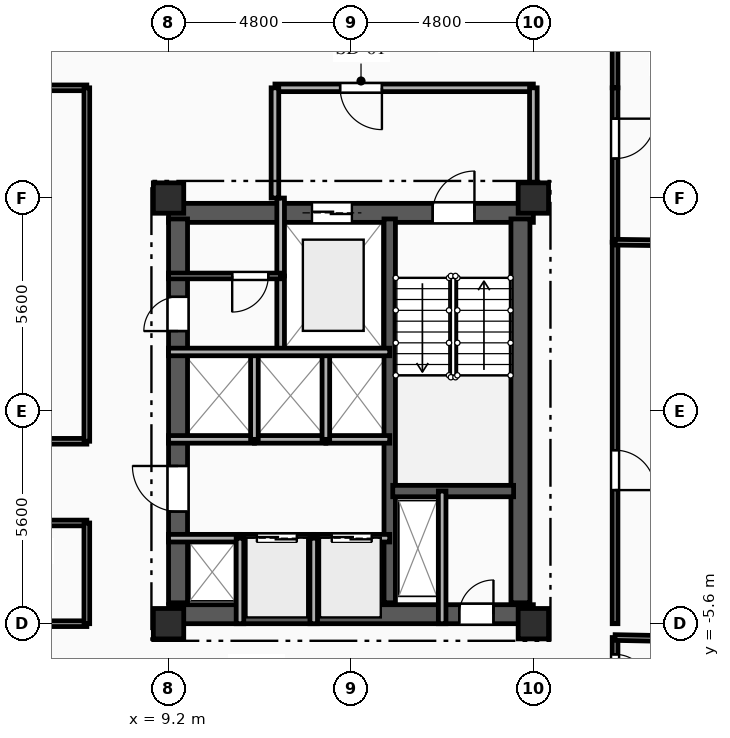
"""IFC4 building model, lengths in metres.
Left out: names, types, materials, properties, quantities, classifications, styles, units other than length and angle.
Written with IfcOpenShell. Run it as: python <this file> out.ifc"""

import sys

from ifc_helpers import new_model, si_unit, direction, frame, frame_2d, origin, origin_2d, place, context, subcontext, project, spatial, rectangle, extrude, element, fill, save


model = new_model("IFC4")
c1 = context("Model", 3, precision=1e-05, world=origin(), true_north=direction((0.0, 1.0)))
c2 = subcontext(c1, "Body", "Model", "MODEL_VIEW")
j1 = project(units=[si_unit("LENGTHUNIT", "METRE"), si_unit("PLANEANGLEUNIT", "RADIAN")], contexts=[c1])
p1 = place(None, origin())
s1 = spatial("IfcSite", under=j1, at=p1, CompositionType="ELEMENT")
p2 = place(p1, origin())
s2 = spatial("IfcBuilding", under=s1, at=p2, CompositionType="ELEMENT")
p3 = place(p2, frame((0.0, 0.0, 193.05)))
s3 = spatial("IfcBuildingStorey", under=s2, at=p3, CompositionType="ELEMENT", Elevation=193.05)
for number, where, z_axis, x_axis in (
    (1, (9.2, -5.6, 0.0), (0.0, 0.0, 1.0), (1.0, 0.0, 0.0)),
    (2, (9.2, 5.6, 0.0), (0.0, 0.0, 1.0), (1.0, 0.0, 0.0)),
    (3, (18.8, -5.6, 0.0), (0.0, 0.0, 1.0), (1.0, 0.0, 0.0)),
    (4, (18.8, 5.6, 0.0), (0.0, 0.0, 1.0), (1.0, 0.0, 0.0)),
):
    element("IfcColumn", number, at=place(p3, frame(where, z_axis=z_axis, x_axis=x_axis)), inside=s3, PredefinedType="COLUMN", context=c2, shape_type="SweptSolid", body=[
        extrude(rectangle(XDim=0.8, YDim=0.8, at=origin_2d()), origin(), (0.0, 0.0, 1.0), 3.35),
    ])
p4 = place(p3, frame((9.2, 5.21, 0.0), z_axis=(0.0, 0.0, 1.0), x_axis=(1.0, 0.0, 0.0)))
e5 = element("IfcWall", 5, at=p4, inside=s3, PredefinedType="SHEAR", context=c2, shape_type="SweptSolid", body=[
    extrude(rectangle(XDim=9.6, YDim=0.5, at=frame_2d((4.8, 0.0))), origin(), (0.0, 0.0, 1.0), 3.04),
])
p5 = place(p4, frame((6.95, 0.0, 0.0)))
e6 = element("IfcOpeningElement", 6, at=p5, cuts=e5, PredefinedType="OPENING", context=c2, shape_type="SweptSolid", body=[
    extrude(rectangle(XDim=1.1, YDim=2.15, at=frame_2d((0.55, 1.075))), frame((0.0, 0.26, 0.0), z_axis=(0.0, -1.0, 0.0), x_axis=(1.0, 0.0, 0.0)), (0.0, 0.0, 1.0), 0.52),
])
p6 = place(p4, frame((3.775, 0.0, 0.0)))
e7 = element("IfcOpeningElement", 7, at=p6, cuts=e5, PredefinedType="OPENING", context=c2, shape_type="SweptSolid", body=[
    extrude(rectangle(XDim=1.05, YDim=2.1, at=frame_2d((0.525, 1.05))), frame((0.0, 0.26, 0.0), z_axis=(0.0, -1.0, 0.0), x_axis=(1.0, 0.0, 0.0)), (0.0, 0.0, 1.0), 0.52),
])
p7 = place(p3, frame((9.2, -5.35, 0.0), z_axis=(0.0, 0.0, 1.0), x_axis=(1.0, 0.0, 0.0)))
e8 = element("IfcWall", 8, at=p7, inside=s3, PredefinedType="SHEAR", context=c2, shape_type="SweptSolid", body=[
    extrude(rectangle(XDim=9.6, YDim=0.5, at=frame_2d((4.8, 0.0))), origin(), (0.0, 0.0, 1.0), 3.04),
])
p8 = place(p7, frame((7.65, 0.0, 0.0)))
e9 = element("IfcOpeningElement", 9, at=p8, cuts=e8, PredefinedType="OPENING", context=c2, shape_type="SweptSolid", body=[
    extrude(rectangle(XDim=0.9, YDim=2.1, at=frame_2d((0.45, 1.05))), frame((0.0, 0.26, 0.0), z_axis=(0.0, -1.0, 0.0), x_axis=(1.0, 0.0, 0.0)), (0.0, 0.0, 1.0), 0.52),
])
p9 = place(p3, frame((9.45, -5.05, 0.0), z_axis=(0.0, 0.0, 1.0), x_axis=(0.0, 1.0, 0.0)))
e10 = element("IfcWall", 10, at=p9, inside=s3, PredefinedType="SHEAR", context=c2, shape_type="SweptSolid", body=[
    extrude(rectangle(XDim=10.1, YDim=0.5, at=frame_2d((5.05, 0.0))), origin(), (0.0, 0.0, 1.0), 3.04),
])
p10 = place(p9, frame((7.15, 0.0, 0.0)))
e11 = element("IfcOpeningElement", 11, at=p10, cuts=e10, PredefinedType="OPENING", context=c2, shape_type="SweptSolid", body=[
    extrude(rectangle(XDim=0.9, YDim=2.1, at=frame_2d((0.45, 1.05))), frame((0.0, 0.26, 0.0), z_axis=(0.0, -1.0, 0.0), x_axis=(1.0, 0.0, 0.0)), (0.0, 0.0, 1.0), 0.52),
])
p11 = place(p9, frame((2.4, 0.0, 0.0)))
e12 = element("IfcOpeningElement", 12, at=p11, cuts=e10, PredefinedType="OPENING", context=c2, shape_type="SweptSolid", body=[
    extrude(rectangle(XDim=1.2, YDim=2.15, at=frame_2d((0.6, 1.075))), frame((0.0, 0.26, 0.0), z_axis=(0.0, -1.0, 0.0), x_axis=(1.0, 0.0, 0.0)), (0.0, 0.0, 1.0), 0.52),
])
p12 = place(p3, frame((18.46, -5.05, 0.0), z_axis=(0.0, 0.0, 1.0), x_axis=(0.0, 1.0, 0.0)))
e13 = element("IfcWall", 13, at=p12, inside=s3, PredefinedType="SHEAR", context=c2, shape_type="SweptSolid", body=[
    extrude(rectangle(XDim=10.1, YDim=0.5, at=frame_2d((5.05, 0.0))), origin(), (0.0, 0.0, 1.0), 3.04),
])
p13 = place(p3, frame((15.02, -5.05, 0.0), z_axis=(0.0, 0.0, 1.0), x_axis=(0.0, 1.0, 0.0)))
e14 = element("IfcWall", 14, at=p13, inside=s3, PredefinedType="SHEAR", context=c2, shape_type="SweptSolid", body=[
    extrude(rectangle(XDim=10.1, YDim=0.3, at=frame_2d((5.05, 0.0))), origin(), (0.0, 0.0, 1.0), 3.04),
])
p14 = place(p3, frame((15.1, -2.11, 0.0), z_axis=(0.0, 0.0, 1.0), x_axis=(1.0, 0.0, 0.0)))
e15 = element("IfcWall", 15, at=p14, inside=s3, PredefinedType="SHEAR", context=c2, shape_type="SweptSolid", body=[
    extrude(rectangle(XDim=3.18, YDim=0.3, at=frame_2d((1.59, 0.0))), origin(), (0.0, 0.0, 1.0), 3.04),
])
p15 = place(p3, frame((16.4, -2.11, 0.0), z_axis=(0.0, 0.0, 1.0), x_axis=(0.0, -1.0, 0.0)))
e16 = element("IfcWall", 16, at=p15, inside=s3, PredefinedType="PARTITIONING", context=c2, shape_type="SweptSolid", body=[
    extrude(rectangle(XDim=3.49, YDim=0.2, at=frame_2d((1.745, 0.0))), origin(), (0.0, 0.0, 1.0), 3.04),
])
p16 = place(p3, frame((12.15, 3.55, 0.0), z_axis=(0.0, 0.0, 1.0), x_axis=(0.0, -1.0, 0.0)))
e17 = element("IfcWall", 17, at=p16, inside=s3, PredefinedType="PARTITIONING", context=c2, shape_type="SweptSolid", body=[
    extrude(rectangle(XDim=2.0, YDim=0.2, at=frame_2d((1.0, 0.0))), origin(), (0.0, 0.0, 1.0), 3.04),
])
p17 = place(p3, frame((12.15, 5.6, 0.0), z_axis=(0.0, 0.0, 1.0), x_axis=(0.0, -1.0, 0.0)))
e18 = element("IfcWall", 18, at=p17, inside=s3, PredefinedType="PARTITIONING", context=c2, shape_type="SweptSolid", body=[
    extrude(rectangle(XDim=2.05, YDim=0.2, at=frame_2d((1.025, 0.0))), origin(), (0.0, 0.0, 1.0), 3.04),
])
p18 = place(p3, frame((18.8, 8.5, 0.0), z_axis=(0.0, 0.0, 1.0), x_axis=(-1.0, 0.0, 0.0)))
e19 = element("IfcWall", 19, at=p18, inside=s3, PredefinedType="PARTITIONING", context=c2, shape_type="SweptSolid", body=[
    extrude(rectangle(XDim=6.8, YDim=0.2, at=frame_2d((3.4, 0.0))), origin(), (0.0, 0.0, 1.0), 3.04),
])
p19 = place(p18, frame((3.985, 0.0, 0.0)))
e20 = element("IfcOpeningElement", 20, at=p19, cuts=e19, PredefinedType="OPENING", context=c2, shape_type="SweptSolid", body=[
    extrude(rectangle(XDim=1.1, YDim=2.15, at=frame_2d((0.55, 1.075))), frame((0.0, 0.11, 0.0), z_axis=(0.0, -1.0, 0.0), x_axis=(1.0, 0.0, 0.0)), (0.0, 0.0, 1.0), 0.22),
])
p20 = place(p3, frame((18.8, 5.6, 0.0), z_axis=(0.0, 0.0, 1.0), x_axis=(0.0, 1.0, 0.0)))
e21 = element("IfcWall", 21, at=p20, inside=s3, PredefinedType="PARTITIONING", context=c2, shape_type="SweptSolid", body=[
    extrude(rectangle(XDim=2.9, YDim=0.2, at=frame_2d((1.45, 0.0))), origin(), (0.0, 0.0, 1.0), 2.665),
])
p21 = place(p3, frame((12.0, 8.5, 0.0), z_axis=(0.0, 0.0, 1.0), x_axis=(0.0, -1.0, 0.0)))
e22 = element("IfcWall", 22, at=p21, inside=s3, PredefinedType="PARTITIONING", context=c2, shape_type="SweptSolid", body=[
    extrude(rectangle(XDim=2.9, YDim=0.2, at=frame_2d((1.45, 0.0))), origin(), (0.0, 0.0, 1.0), 3.04),
])
p22 = place(p3, frame((12.15, 3.55, 0.0), z_axis=(0.0, 0.0, 1.0), x_axis=(-1.0, 0.0, 0.0)))
e23 = element("IfcWall", 23, at=p22, inside=s3, PredefinedType="PARTITIONING", context=c2, shape_type="SweptSolid", body=[
    extrude(rectangle(XDim=2.95, YDim=0.15, at=frame_2d((1.475, 0.0))), origin(), (0.0, 0.0, 1.0), 3.04),
])
p23 = place(p22, frame((0.325, 0.0, 0.0)))
e24 = element("IfcOpeningElement", 24, at=p23, cuts=e23, PredefinedType="OPENING", context=c2, shape_type="SweptSolid", body=[
    extrude(rectangle(XDim=0.95, YDim=2.1, at=frame_2d((0.475, 1.05))), frame((0.0, 0.085, 0.0), z_axis=(0.0, -1.0, 0.0), x_axis=(1.0, 0.0, 0.0)), (0.0, 0.0, 1.0), 0.17),
])
p24 = place(p3, frame((9.2, -3.35, 0.0), z_axis=(0.0, 0.0, 1.0), x_axis=(1.0, 0.0, 0.0)))
e25 = element("IfcWall", 25, at=p24, inside=s3, PredefinedType="PARTITIONING", context=c2, shape_type="SweptSolid", body=[
    extrude(rectangle(XDim=1.88, YDim=0.2, at=frame_2d((0.94, 0.0))), origin(), (0.0, 0.0, 1.0), 2.755),
])
p25 = place(p3, frame((11.08, -3.35, 0.0), z_axis=(0.0, 0.0, 1.0), x_axis=(1.0, 0.0, 0.0)))
e26 = element("IfcWall", 26, at=p25, inside=s3, PredefinedType="PARTITIONING", context=c2, shape_type="SweptSolid", body=[
    extrude(rectangle(XDim=1.94, YDim=0.2, at=frame_2d((0.97, 0.0))), origin(), (0.0, 0.0, 1.0), 3.04),
])
p26 = place(p25, frame((0.445, 0.0, 0.0)))
e27 = element("IfcOpeningElement", 27, at=p26, cuts=e26, PredefinedType="OPENING", context=c2, shape_type="SweptSolid", body=[
    extrude(rectangle(XDim=1.05, YDim=2.1, at=frame_2d((0.525, 1.05))), frame((0.0, 0.11, 0.0), z_axis=(0.0, -1.0, 0.0), x_axis=(1.0, 0.0, 0.0)), (0.0, 0.0, 1.0), 0.22),
])
p27 = place(p3, frame((13.02, -3.35, 0.0), z_axis=(0.0, 0.0, 1.0), x_axis=(1.0, 0.0, 0.0)))
e28 = element("IfcWall", 28, at=p27, inside=s3, PredefinedType="PARTITIONING", context=c2, shape_type="SweptSolid", body=[
    extrude(rectangle(XDim=2.0, YDim=0.2, at=frame_2d((1.0, 0.0))), origin(), (0.0, 0.0, 1.0), 3.04),
])
p28 = place(p27, frame((0.475, 0.0, 0.0)))
e29 = element("IfcOpeningElement", 29, at=p28, cuts=e28, PredefinedType="OPENING", context=c2, shape_type="SweptSolid", body=[
    extrude(rectangle(XDim=1.05, YDim=2.1, at=frame_2d((0.525, 1.05))), frame((0.0, 0.11, 0.0), z_axis=(0.0, -1.0, 0.0), x_axis=(1.0, 0.0, 0.0)), (0.0, 0.0, 1.0), 0.22),
])
p29 = place(p3, frame((11.46, -0.75, 0.0), z_axis=(0.0, 0.0, 1.0), x_axis=(-1.0, 0.0, 0.0)))
e30 = element("IfcWall", 30, at=p29, inside=s3, PredefinedType="PARTITIONING", context=c2, shape_type="SweptSolid", body=[
    extrude(rectangle(XDim=2.26, YDim=0.2, at=frame_2d((1.13, 0.0))), origin(), (0.0, 0.0, 1.0), 3.04),
])
p30 = place(p3, frame((13.34, -0.75, 0.0), z_axis=(0.0, 0.0, 1.0), x_axis=(-1.0, 0.0, 0.0)))
e31 = element("IfcWall", 31, at=p30, inside=s3, PredefinedType="PARTITIONING", context=c2, shape_type="SweptSolid", body=[
    extrude(rectangle(XDim=1.88, YDim=0.2, at=frame_2d((0.94, 0.0))), origin(), (0.0, 0.0, 1.0), 3.04),
])
p31 = place(p3, frame((15.02, -0.75, 0.0), z_axis=(0.0, 0.0, 1.0), x_axis=(-1.0, 0.0, 0.0)))
e32 = element("IfcWall", 32, at=p31, inside=s3, PredefinedType="PARTITIONING", context=c2, shape_type="SweptSolid", body=[
    extrude(rectangle(XDim=1.68, YDim=0.2, at=frame_2d((0.84, 0.0))), origin(), (0.0, 0.0, 1.0), 3.04),
])
for number, where, z_axis, x_axis in (
    (33, (11.08, -5.6, 0.0), (0.0, 0.0, 1.0), (0.0, 1.0, 0.0)),
    (34, (13.02, -5.6, 0.0), (0.0, 0.0, 1.0), (0.0, 1.0, 0.0)),
):
    element("IfcWall", number, at=place(p3, frame(where, z_axis=z_axis, x_axis=x_axis)), inside=s3, PredefinedType="PARTITIONING", context=c2, shape_type="SweptSolid", body=[
        extrude(rectangle(XDim=2.25, YDim=0.2, at=frame_2d((1.125, 0.0))), origin(), (0.0, 0.0, 1.0), 3.04),
    ])
for number, where, z_axis, x_axis in (
    (35, (11.46, -0.75, 0.0), (0.0, 0.0, 1.0), (0.0, 1.0, 0.0)),
    (36, (13.34, -0.75, 0.0), (0.0, 0.0, 1.0), (0.0, 1.0, 0.0)),
):
    element("IfcWall", number, at=place(p3, frame(where, z_axis=z_axis, x_axis=x_axis)), inside=s3, PredefinedType="PARTITIONING", context=c2, shape_type="SweptSolid", body=[
        extrude(rectangle(XDim=2.3, YDim=0.2, at=frame_2d((1.15, 0.0))), origin(), (0.0, 0.0, 1.0), 3.04),
    ])
p32 = place(p3, frame((20.95, 10.65, 0.0), z_axis=(0.0, 0.0, 1.0), x_axis=(0.0, -1.0, 0.0)))
e37 = element("IfcWall", 37, at=p32, inside=s3, PredefinedType="PARTITIONING", context=c2, shape_type="SweptSolid", body=[
    extrude(rectangle(XDim=2.15, YDim=0.15, at=frame_2d((1.075, 0.0))), origin(), (0.0, 0.0, 1.0), 3.04),
])
p33 = place(p3, frame((7.05, 8.5, 0.0), z_axis=(0.0, 0.0, 1.0), x_axis=(-1.0, 0.0, 0.0)))
e38 = element("IfcWall", 38, at=p33, inside=s3, PredefinedType="PARTITIONING", context=c2, shape_type="SweptSolid", body=[
    extrude(rectangle(XDim=7.05, YDim=0.15, at=frame_2d((3.525, 0.0))), origin(), (0.0, 0.0, 1.0), 3.04),
])
p34 = place(p3, frame((20.95, -5.964, 0.0), z_axis=(0.0, 0.0, 1.0), x_axis=(0.0, -1.0, 0.0)))
e39 = element("IfcWall", 39, at=p34, inside=s3, PredefinedType="PARTITIONING", context=c2, shape_type="SweptSolid", body=[
    extrude(rectangle(XDim=1.786, YDim=0.15, at=frame_2d((0.893, 0.0))), origin(), (0.0, 0.0, 1.0), 3.04),
])
p35 = place(p34, frame((0.443, 0.0, 0.0)))
e40 = element("IfcOpeningElement", 40, at=p35, cuts=e39, PredefinedType="OPENING", context=c2, shape_type="SweptSolid", body=[
    extrude(rectangle(XDim=0.9, YDim=2.1, at=frame_2d((0.45, 1.05))), frame((0.0, 0.085, 0.0), z_axis=(0.0, -1.0, 0.0), x_axis=(1.0, 0.0, 0.0)), (0.0, 0.0, 1.0), 0.17),
])
p36 = place(p3, frame((0.0, -5.6, 0.0), z_axis=(0.0, 0.0, 1.0), x_axis=(1.0, 0.0, 0.0)))
e41 = element("IfcWall", 41, at=p36, inside=s3, PredefinedType="PARTITIONING", context=c2, shape_type="SweptSolid", body=[
    extrude(rectangle(XDim=7.05, YDim=0.15, at=frame_2d((3.525, 0.0))), origin(), (0.0, 0.0, 1.0), 2.525),
])
p37 = place(p36, frame((1.185, 0.0, 0.0)))
e42 = element("IfcOpeningElement", 42, at=p37, cuts=e41, PredefinedType="OPENING", context=c2, shape_type="SweptSolid", body=[
    extrude(rectangle(XDim=1.05, YDim=2.15, at=frame_2d((0.525, 1.075))), frame((0.0, 0.085, 0.0), z_axis=(0.0, -1.0, 0.0), x_axis=(1.0, 0.0, 0.0)), (0.0, 0.0, 1.0), 0.17),
])
p38 = place(p3, frame((20.95, 4.438, 0.0), z_axis=(0.0, 0.0, 1.0), x_axis=(0.0, -1.0, 0.0)))
e43 = element("IfcWall", 43, at=p38, inside=s3, PredefinedType="PARTITIONING", context=c2, shape_type="SweptSolid", body=[
    extrude(rectangle(XDim=10.038, YDim=0.15, at=frame_2d((5.019, 0.0))), origin(), (0.0, 0.0, 1.0), 2.695),
])
p39 = place(p38, frame((5.472, 0.0, 0.0)))
e44 = element("IfcOpeningElement", 44, at=p39, cuts=e43, PredefinedType="OPENING", context=c2, shape_type="SweptSolid", body=[
    extrude(rectangle(XDim=1.05, YDim=2.15, at=frame_2d((0.525, 1.075))), frame((0.0, 0.085, 0.0), z_axis=(0.0, -1.0, 0.0), x_axis=(1.0, 0.0, 0.0)), (0.0, 0.0, 1.0), 0.17),
])
p40 = place(p3, frame((20.95, 8.5, 0.0), z_axis=(0.0, 0.0, 1.0), x_axis=(0.0, -1.0, 0.0)))
e45 = element("IfcWall", 45, at=p40, inside=s3, PredefinedType="PARTITIONING", context=c2, shape_type="SweptSolid", body=[
    extrude(rectangle(XDim=4.062, YDim=0.15, at=frame_2d((2.031, 0.0))), origin(), (0.0, 0.0, 1.0), 3.04),
])
p41 = place(p40, frame((0.812, 0.0, 0.0)))
e46 = element("IfcOpeningElement", 46, at=p41, cuts=e45, PredefinedType="OPENING", context=c2, shape_type="SweptSolid", body=[
    extrude(rectangle(XDim=1.05, YDim=2.15, at=frame_2d((0.525, 1.075))), frame((0.0, 0.085, 0.0), z_axis=(0.0, -1.0, 0.0), x_axis=(1.0, 0.0, 0.0)), (0.0, 0.0, 1.0), 0.17),
])
p42 = place(p3, frame((-7.05, -0.8, 0.0), z_axis=(0.0, 0.0, 1.0), x_axis=(1.0, 0.0, 0.0)))
e47 = element("IfcWall", 47, at=p42, inside=s3, PredefinedType="PARTITIONING", context=c2, shape_type="SweptSolid", body=[
    extrude(rectangle(XDim=14.1, YDim=0.15, at=frame_2d((7.05, 0.0))), origin(), (0.0, 0.0, 1.0), 3.04),
])
p43 = place(p42, frame((6.525, 0.0, 0.0)))
e48 = element("IfcOpeningElement", 48, at=p43, cuts=e47, PredefinedType="OPENING", context=c2, shape_type="SweptSolid", body=[
    extrude(rectangle(XDim=1.05, YDim=2.15, at=frame_2d((0.525, 1.075))), frame((0.0, 0.085, 0.0), z_axis=(0.0, -1.0, 0.0), x_axis=(1.0, 0.0, 0.0)), (0.0, 0.0, 1.0), 0.17),
])
p44 = place(p3, frame((7.05, -2.95, 0.0), z_axis=(0.0, 0.0, 1.0), x_axis=(-1.0, 0.0, 0.0)))
e49 = element("IfcWall", 49, at=p44, inside=s3, PredefinedType="PARTITIONING", context=c2, shape_type="SweptSolid", body=[
    extrude(rectangle(XDim=7.05, YDim=0.15, at=frame_2d((3.525, 0.0))), origin(), (0.0, 0.0, 1.0), 3.04),
])
p45 = place(p3, frame((7.05, -0.8, 0.0), z_axis=(0.0, 0.0, 1.0), x_axis=(0.0, 1.0, 0.0)))
e50 = element("IfcWall", 50, at=p45, inside=s3, PredefinedType="PARTITIONING", context=c2, shape_type="SweptSolid", body=[
    extrude(rectangle(XDim=9.3, YDim=0.15, at=frame_2d((4.65, 0.0))), origin(), (0.0, 0.0, 1.0), 3.04),
])
p46 = place(p3, frame((7.05, -5.6, 0.0), z_axis=(0.0, 0.0, 1.0), x_axis=(0.0, 1.0, 0.0)))
e51 = element("IfcWall", 51, at=p46, inside=s3, PredefinedType="PARTITIONING", context=c2, shape_type="SweptSolid", body=[
    extrude(rectangle(XDim=2.65, YDim=0.15, at=frame_2d((1.325, 0.0))), origin(), (0.0, 0.0, 1.0), 3.04),
])
p47 = place(p3, frame((20.95, -5.964, 0.0), z_axis=(0.0, 0.0, 1.0), x_axis=(0.999809784752, -0.019503700029, 0.0)))
e52 = element("IfcWall", 52, at=p47, inside=s3, PredefinedType="PARTITIONING", context=c2, shape_type="SweptSolid", body=[
    extrude(rectangle(XDim=2.241, YDim=0.15, at=frame_2d((1.12, 0.0))), origin(), (0.0, 0.0, 1.0), 3.04),
])
p48 = place(p3, frame((20.95, 4.438, 0.0), z_axis=(0.0, 0.0, 1.0), x_axis=(0.999913116238, -0.013181804667, 0.0)))
e53 = element("IfcWall", 53, at=p48, inside=s3, PredefinedType="PARTITIONING", context=c2, shape_type="SweptSolid", body=[
    extrude(rectangle(XDim=3.334, YDim=0.15, at=frame_2d((1.667, 0.0))), origin(), (0.0, 0.0, 1.0), 3.04),
])
p49 = place(p3, frame((9.2, 1.55, 0.0), z_axis=(0.0, 0.0, 1.0), x_axis=(1.0, 0.0, 0.0)))
e54 = element("IfcWall", 54, at=p49, inside=s3, PredefinedType="PARTITIONING", context=c2, shape_type="SweptSolid", body=[
    extrude(rectangle(XDim=5.82, YDim=0.2, at=frame_2d((2.91, 0.0))), origin(), (0.0, 0.0, 1.0), 3.04),
])
p50 = place(p5, origin())
e55 = element("IfcDoor", 55, at=p50, inside=s3, OperationType="SINGLE_SWING_RIGHT", PredefinedType="DOOR", context=c2, shape_type="SweptSolid", body=[
    extrude(rectangle(XDim=1.1, YDim=2.15, at=frame_2d((0.55, 1.075))), frame((0.0, 0.025, 0.0), z_axis=(0.0, -1.0, 0.0), x_axis=(1.0, 0.0, 0.0)), (0.0, 0.0, 1.0), 0.05),
])
fill(e6, e55)
p51 = place(p6, origin())
e56 = element("IfcDoor", 56, at=p51, inside=s3, OperationType="DOUBLE_DOOR_SLIDING", PredefinedType="DOOR", context=c2, shape_type="SweptSolid", body=[
    extrude(rectangle(XDim=1.05, YDim=2.1, at=frame_2d((0.525, 1.05))), frame((0.0, 0.025, 0.0), z_axis=(0.0, -1.0, 0.0), x_axis=(1.0, 0.0, 0.0)), (0.0, 0.0, 1.0), 0.05),
])
fill(e7, e56)
p52 = place(p8, origin())
e57 = element("IfcDoor", 57, at=p52, inside=s3, OperationType="SINGLE_SWING_RIGHT", PredefinedType="DOOR", context=c2, shape_type="SweptSolid", body=[
    extrude(rectangle(XDim=0.9, YDim=2.1, at=frame_2d((0.45, 1.05))), frame((0.0, 0.025, 0.0), z_axis=(0.0, -1.0, 0.0), x_axis=(1.0, 0.0, 0.0)), (0.0, 0.0, 1.0), 0.05),
])
fill(e9, e57)
p53 = place(p19, origin())
e58 = element("IfcDoor", 58, at=p53, inside=s3, OperationType="SINGLE_SWING_LEFT", PredefinedType="DOOR", context=c2, shape_type="SweptSolid", body=[
    extrude(rectangle(XDim=1.1, YDim=2.15, at=frame_2d((0.55, 1.075))), frame((0.0, 0.025, 0.0), z_axis=(0.0, -1.0, 0.0), x_axis=(1.0, 0.0, 0.0)), (0.0, 0.0, 1.0), 0.05),
])
fill(e20, e58)
p54 = place(p23, origin())
e59 = element("IfcDoor", 59, at=p54, inside=s3, OperationType="SINGLE_SWING_RIGHT", PredefinedType="DOOR", context=c2, shape_type="SweptSolid", body=[
    extrude(rectangle(XDim=0.95, YDim=2.1, at=frame_2d((0.475, 1.05))), frame((0.0, 0.025, 0.0), z_axis=(0.0, -1.0, 0.0), x_axis=(1.0, 0.0, 0.0)), (0.0, 0.0, 1.0), 0.05),
])
fill(e24, e59)
p55 = place(p10, origin())
e60 = element("IfcDoor", 60, at=p55, inside=s3, OperationType="SINGLE_SWING_LEFT", PredefinedType="DOOR", context=c2, shape_type="SweptSolid", body=[
    extrude(rectangle(XDim=0.9, YDim=2.1, at=frame_2d((0.45, 1.05))), frame((0.0, 0.025, 0.0), z_axis=(0.0, -1.0, 0.0), x_axis=(1.0, 0.0, 0.0)), (0.0, 0.0, 1.0), 0.05),
])
fill(e11, e60)
p56 = place(p26, origin())
e61 = element("IfcDoor", 61, at=p56, inside=s3, OperationType="DOUBLE_DOOR_SLIDING", PredefinedType="DOOR", context=c2, shape_type="SweptSolid", body=[
    extrude(rectangle(XDim=1.05, YDim=2.1, at=frame_2d((0.525, 1.05))), frame((0.0, 0.025, 0.0), z_axis=(0.0, -1.0, 0.0), x_axis=(1.0, 0.0, 0.0)), (0.0, 0.0, 1.0), 0.05),
])
fill(e27, e61)
p57 = place(p28, origin())
e62 = element("IfcDoor", 62, at=p57, inside=s3, OperationType="DOUBLE_DOOR_SLIDING", PredefinedType="DOOR", context=c2, shape_type="SweptSolid", body=[
    extrude(rectangle(XDim=1.05, YDim=2.1, at=frame_2d((0.525, 1.05))), frame((0.0, 0.025, 0.0), z_axis=(0.0, -1.0, 0.0), x_axis=(1.0, 0.0, 0.0)), (0.0, 0.0, 1.0), 0.05),
])
fill(e29, e62)
p58 = place(p11, origin())
e63 = element("IfcDoor", 63, at=p58, inside=s3, OperationType="SINGLE_SWING_RIGHT", PredefinedType="DOOR", context=c2, shape_type="SweptSolid", body=[
    extrude(rectangle(XDim=1.2, YDim=2.15, at=frame_2d((0.6, 1.075))), frame((0.0, 0.025, 0.0), z_axis=(0.0, -1.0, 0.0), x_axis=(1.0, 0.0, 0.0)), (0.0, 0.0, 1.0), 0.05),
])
fill(e12, e63)
p59 = place(p35, origin())
e64 = element("IfcDoor", 64, at=p59, inside=s3, OperationType="SINGLE_SWING_RIGHT", PredefinedType="DOOR", context=c2, shape_type="SweptSolid", body=[
    extrude(rectangle(XDim=0.9, YDim=2.1, at=frame_2d((0.45, 1.05))), frame((0.0, 0.025, 0.0), z_axis=(0.0, -1.0, 0.0), x_axis=(1.0, 0.0, 0.0)), (0.0, 0.0, 1.0), 0.05),
])
fill(e40, e64)
p60 = place(p39, origin())
e65 = element("IfcDoor", 65, at=p60, inside=s3, OperationType="SINGLE_SWING_RIGHT", PredefinedType="DOOR", context=c2, shape_type="SweptSolid", body=[
    extrude(rectangle(XDim=1.05, YDim=2.15, at=frame_2d((0.525, 1.075))), frame((0.0, 0.025, 0.0), z_axis=(0.0, -1.0, 0.0), x_axis=(1.0, 0.0, 0.0)), (0.0, 0.0, 1.0), 0.05),
])
fill(e44, e65)
p61 = place(p41, origin())
e66 = element("IfcDoor", 66, at=p61, inside=s3, OperationType="SINGLE_SWING_LEFT", PredefinedType="DOOR", context=c2, shape_type="SweptSolid", body=[
    extrude(rectangle(XDim=1.05, YDim=2.15, at=frame_2d((0.525, 1.075))), frame((0.0, 0.025, 0.0), z_axis=(0.0, -1.0, 0.0), x_axis=(1.0, 0.0, 0.0)), (0.0, 0.0, 1.0), 0.05),
])
fill(e46, e66)
save(model, sys.argv[1])
